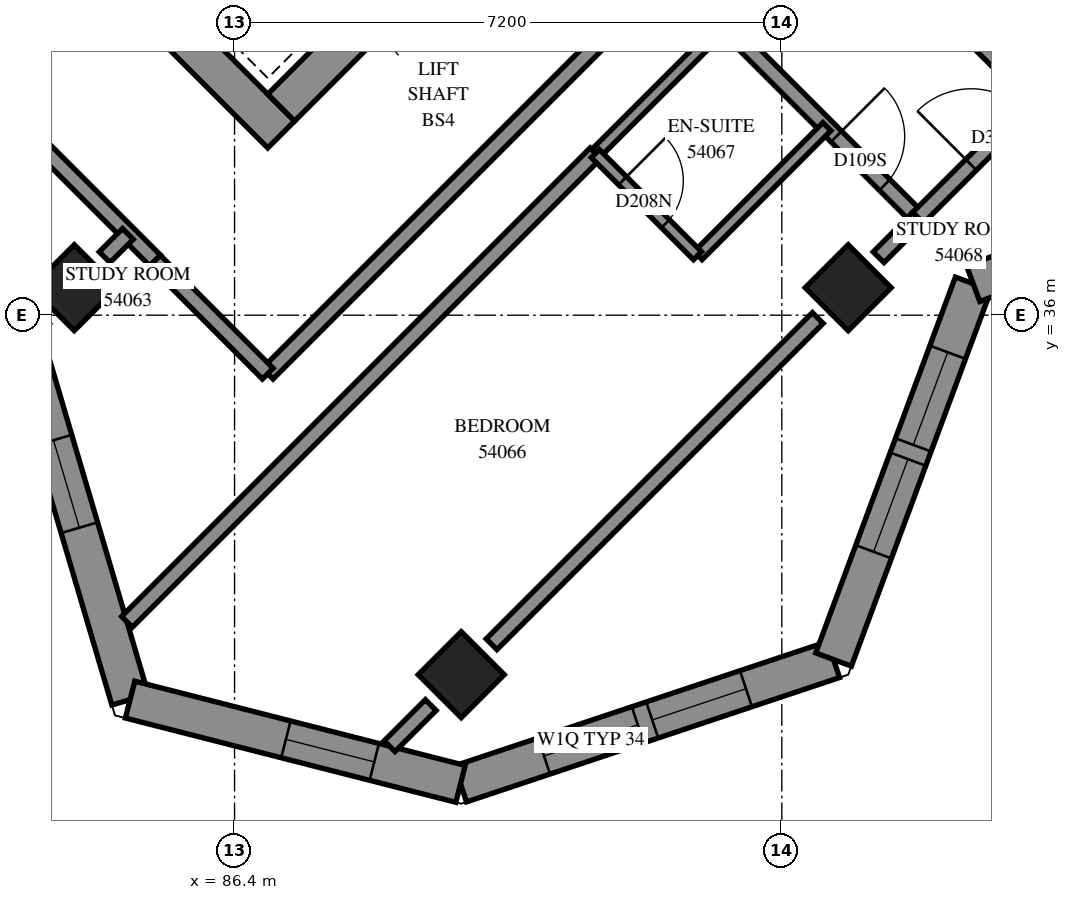
"""IFC4 building model, lengths in metres.
Left out: names, types, materials, properties, quantities, classifications, styles, units other than length and angle.
Written with IfcOpenShell. Run it as: python <this file> out.ifc"""

import sys

from ifc_helpers import new_model, si_unit, direction, frame, frame_2d, origin, origin_2d, place, context, subcontext, project, spatial, polyline, rectangle, outline, extrude, element, fill, save


model = new_model("IFC4")
c1 = context("Model", 3, precision=1e-05, world=origin(), true_north=direction((0.0, 1.0)))
c2 = subcontext(c1, "Body", "Model", "MODEL_VIEW")
j1 = project(units=[si_unit("LENGTHUNIT", "METRE"), si_unit("PLANEANGLEUNIT", "RADIAN")], contexts=[c1])
p1 = place(None, origin())
s1 = spatial("IfcSite", under=j1, at=p1, CompositionType="ELEMENT")
p2 = place(p1, origin())
s2 = spatial("IfcBuilding", under=s1, at=p2, CompositionType="ELEMENT")
p3 = place(p2, frame((0.0, 0.0, 199.8)))
s3 = spatial("IfcBuildingStorey", under=s2, at=p3, CompositionType="ELEMENT", Elevation=199.8)
for number, where, z_axis, x_axis in (
    (1, (84.291, 36.362, 0.0), (0.0, 0.0, 1.0), (0.707, -0.707, 0.0)),
    (2, (94.474, 36.362, 0.0), (0.0, 0.0, 1.0), (0.707, -0.707, 0.0)),
    (3, (89.382, 31.271, 0.0), (0.0, 0.0, 1.0), (0.707, -0.707, 0.0)),
):
    element("IfcColumn", number, at=place(p3, frame(where, z_axis=z_axis, x_axis=x_axis)), inside=s3, PredefinedType="COLUMN", context=c2, shape_type="SweptSolid", body=[
        extrude(rectangle(XDim=0.8, YDim=0.8, at=origin_2d()), origin(), (0.0, 0.0, 1.0), 3.1),
    ])
p4 = place(p3, frame((76.124, 49.267, -0.3), z_axis=(0.0, 0.0, 1.0), x_axis=(0.7071067812, -0.7071067812, 0.0)))
e4 = element("IfcWall", 4, at=p4, inside=s3, PredefinedType="SHEAR", context=c2, shape_type="SweptSolid", body=[
    extrude(rectangle(XDim=15.4, YDim=0.5, at=frame_2d((7.7, 0.0))), origin(), (0.0, 0.0, 1.0), 2.7),
])
p5 = place(p3, frame((87.013, 38.731, -0.3), z_axis=(0.0, 0.0, 1.0), x_axis=(0.7071067812, 0.7071067812, 0.0)))
e5 = element("IfcWall", 5, at=p5, inside=s3, PredefinedType="SHEAR", context=c2, shape_type="SweptSolid", body=[
    extrude(rectangle(XDim=14.4, YDim=0.5, at=frame_2d((7.2, 0.0))), origin(), (0.0, 0.0, 1.0), 2.7),
])
p6 = place(p5, frame((4.55, 0.0, 0.3)))
e6 = element("IfcOpeningElement", 6, at=p6, cuts=e5, PredefinedType="OPENING", context=c2, shape_type="SweptSolid", body=[
    extrude(rectangle(XDim=1.1, YDim=2.1, at=frame_2d((0.55, 1.05))), frame((0.0, 0.26, 0.0), z_axis=(0.0, -1.0, 0.0), x_axis=(1.0, 0.0, 0.0)), (0.0, 0.0, 1.0), 0.52),
])
p7 = place(p5, frame((11.35, 0.0, 0.3)))
e7 = element("IfcOpeningElement", 7, at=p7, cuts=e5, PredefinedType="OPENING", context=c2, shape_type="SweptSolid", body=[
    extrude(rectangle(XDim=1.1, YDim=2.1, at=frame_2d((0.55, 1.05))), frame((0.0, 0.26, 0.0), z_axis=(0.0, -1.0, 0.0), x_axis=(1.0, 0.0, 0.0)), (0.0, 0.0, 1.0), 0.52),
])
p8 = place(p3, frame((89.373, 29.834, 0.0), z_axis=(0.0, 0.0, 1.0), x_axis=(0.9486871639, 0.3162161681, 0.0)))
e8 = element("IfcWall", 8, at=p8, inside=s3, PredefinedType="SOLIDWALL", context=c2, shape_type="SweptSolid", body=[
    extrude(outline(polyline([(-0.073, -0.25), (5.293, -0.25), (5.054, 0.25), (0.073, 0.25), (-0.073, -0.25)])), origin(), (0.0, 0.0, 1.0), 3.1),
])
p9 = place(p8, frame((1.158, 0.0, 0.45)))
e9 = element("IfcOpeningElement", 9, at=p9, cuts=e8, PredefinedType="OPENING", context=c2, shape_type="SweptSolid", body=[
    extrude(rectangle(XDim=1.3, YDim=2.5, at=frame_2d((0.65, 1.25))), frame((0.0, 0.26, 0.0), z_axis=(0.0, -1.0, 0.0), x_axis=(1.0, 0.0, 0.0)), (0.0, 0.0, 1.0), 0.52),
])
p10 = place(p8, frame((2.658, 0.0, 0.45)))
e10 = element("IfcOpeningElement", 10, at=p10, cuts=e8, PredefinedType="OPENING", context=c2, shape_type="SweptSolid", body=[
    extrude(rectangle(XDim=1.3, YDim=2.5, at=frame_2d((0.65, 1.25))), frame((0.0, 0.26, 0.0), z_axis=(0.0, -1.0, 0.0), x_axis=(1.0, 0.0, 0.0)), (0.0, 0.0, 1.0), 0.52),
])
p11 = place(p3, frame((94.281, 31.47, 0.0), z_axis=(0.0, 0.0, 1.0), x_axis=(0.3481903374, 0.9374238577, 0.0)))
e11 = element("IfcWall", 11, at=p11, inside=s3, PredefinedType="SOLIDWALL", context=c2, shape_type="SweptSolid", body=[
    extrude(outline(polyline([(-0.12, -0.25), (5.16, -0.25), (5.39, 0.25), (0.12, 0.25), (-0.12, -0.25)])), origin(), (0.0, 0.0, 1.0), 3.1),
])
p12 = place(p11, frame((1.512, 0.0, 0.45)))
e12 = element("IfcOpeningElement", 12, at=p12, cuts=e11, PredefinedType="OPENING", context=c2, shape_type="SweptSolid", body=[
    extrude(rectangle(XDim=1.3, YDim=2.5, at=frame_2d((0.65, 1.25))), frame((0.0, 0.26, 0.0), z_axis=(0.0, -1.0, 0.0), x_axis=(1.0, 0.0, 0.0)), (0.0, 0.0, 1.0), 0.52),
])
p13 = place(p11, frame((3.012, 0.0, 0.45)))
e13 = element("IfcOpeningElement", 13, at=p13, cuts=e11, PredefinedType="OPENING", context=c2, shape_type="SweptSolid", body=[
    extrude(rectangle(XDim=1.3, YDim=2.5, at=frame_2d((0.65, 1.25))), frame((0.0, 0.26, 0.0), z_axis=(0.0, -1.0, 0.0), x_axis=(1.0, 0.0, 0.0)), (0.0, 0.0, 1.0), 0.52),
])
p14 = place(p3, frame((96.118, 36.415, 0.0), z_axis=(0.0, 0.0, 1.0), x_axis=(0.9374238577, 0.3481903374, 0.0)))
e14 = element("IfcWall", 14, at=p14, inside=s3, PredefinedType="SOLIDWALL", context=c2, shape_type="SweptSolid", body=[
    extrude(outline(polyline([(0.115, -0.25), (5.395, -0.25), (5.155, 0.25), (-0.115, 0.25), (0.115, -0.25)])), origin(), (0.0, 0.0, 1.0), 3.1),
])
p15 = place(p14, frame((1.655, 0.0, 0.45)))
e15 = element("IfcOpeningElement", 15, at=p15, cuts=e14, PredefinedType="OPENING", context=c2, shape_type="SweptSolid", body=[
    extrude(rectangle(XDim=1.3, YDim=2.5, at=frame_2d((0.65, 1.25))), frame((0.0, 0.26, 0.0), z_axis=(0.0, -1.0, 0.0), x_axis=(1.0, 0.0, 0.0)), (0.0, 0.0, 1.0), 0.52),
])
p16 = place(p14, frame((3.155, 0.0, 0.45)))
e16 = element("IfcOpeningElement", 16, at=p16, cuts=e14, PredefinedType="OPENING", context=c2, shape_type="SweptSolid", body=[
    extrude(rectangle(XDim=1.3, YDim=2.5, at=frame_2d((0.65, 1.25))), frame((0.0, 0.26, 0.0), z_axis=(0.0, -1.0, 0.0), x_axis=(1.0, 0.0, 0.0)), (0.0, 0.0, 1.0), 0.52),
])
p17 = place(p3, frame((83.724, 35.351, 0.0), z_axis=(0.0, 0.0, 1.0), x_axis=(0.2831378676, -0.9590792188, 0.0)))
e17 = element("IfcWall", 17, at=p17, inside=s3, PredefinedType="SOLIDWALL", context=c2, shape_type="SweptSolid", body=[
    extrude(outline(polyline([(0.136, -0.25), (4.739, -0.25), (4.455, 0.25), (-0.136, 0.25), (0.136, -0.25)])), origin(), (0.0, 0.0, 1.0), 3.1),
])
p18 = place(p17, frame((1.038, 0.0, 0.45)))
e18 = element("IfcOpeningElement", 18, at=p18, cuts=e17, PredefinedType="OPENING", context=c2, shape_type="SweptSolid", body=[
    extrude(rectangle(XDim=1.2, YDim=2.5, at=frame_2d((0.6, 1.25))), frame((0.0, 0.26, 0.0), z_axis=(0.0, -1.0, 0.0), x_axis=(1.0, 0.0, 0.0)), (0.0, 0.0, 1.0), 0.52),
])
p19 = place(p3, frame((85.026, 30.942, 0.0), z_axis=(0.0, 0.0, 1.0), x_axis=(0.9689909926, -0.2470960468, 0.0)))
e19 = element("IfcWall", 19, at=p19, inside=s3, PredefinedType="SOLIDWALL", context=c2, shape_type="SweptSolid", body=[
    extrude(outline(polyline([(-0.142, -0.25), (4.56, -0.25), (4.413, 0.25), (0.142, 0.25), (-0.142, -0.25)])), origin(), (0.0, 0.0, 1.0), 3.1),
])
p20 = place(p19, frame((2.115, 0.0, 0.45)))
e20 = element("IfcOpeningElement", 20, at=p20, cuts=e19, PredefinedType="OPENING", context=c2, shape_type="SweptSolid", body=[
    extrude(rectangle(XDim=1.2, YDim=2.5, at=frame_2d((0.6, 1.25))), frame((0.0, 0.26, 0.0), z_axis=(0.0, -1.0, 0.0), x_axis=(1.0, 0.0, 0.0)), (0.0, 0.0, 1.0), 0.52),
])
p21 = place(p3, frame((84.984, 31.966, 0.0), z_axis=(0.0, 0.0, 1.0), x_axis=(0.7071067812, 0.7071067812, 0.0)))
e21 = element("IfcWall", 21, at=p21, inside=s3, PredefinedType="PARTITIONING", context=c2, shape_type="SweptSolid", body=[
    extrude(rectangle(XDim=8.719, YDim=0.2, at=frame_2d((4.359, 0.0))), origin(), (0.0, 0.0, 1.0), 3.1),
])
p22 = place(p3, frame((86.835, 35.231, 0.0), z_axis=(0.0, 0.0, 1.0), x_axis=(0.7071067812, 0.7071067812, 0.0)))
e22 = element("IfcWall", 22, at=p22, inside=s3, PredefinedType="PARTITIONING", context=c2, shape_type="SweptSolid", body=[
    extrude(rectangle(XDim=7.501, YDim=0.2, at=frame_2d((3.751, 0.0))), origin(), (0.0, 0.0, 1.0), 3.1),
])
p23 = place(p22, frame((6.243, 0.0, 0.0)))
e23 = element("IfcOpeningElement", 23, at=p23, cuts=e22, PredefinedType="OPENING", context=c2, shape_type="SweptSolid", body=[
    extrude(rectangle(XDim=1.0, YDim=2.1, at=frame_2d((0.5, 1.05))), frame((0.0, 0.11, 0.0), z_axis=(0.0, -1.0, 0.0), x_axis=(1.0, 0.0, 0.0)), (0.0, 0.0, 1.0), 0.22),
])
p24 = place(p3, frame((80.522, 41.553, 0.0), z_axis=(0.0, 0.0, 1.0), x_axis=(0.7071067812, -0.7071067812, 0.0)))
e24 = element("IfcWall", 24, at=p24, inside=s3, PredefinedType="PARTITIONING", context=c2, shape_type="SweptSolid", body=[
    extrude(rectangle(XDim=6.836, YDim=0.2, at=frame_2d((3.418, 0.0))), origin(), (0.0, 0.0, 1.0), 3.1),
])
p25 = place(p3, frame((89.781, 31.671, 0.0), z_axis=(0.0, 0.0, 1.0), x_axis=(0.7071067812, 0.7071067812, 0.0)))
e25 = element("IfcWall", 25, at=p25, inside=s3, PredefinedType="PARTITIONING", context=c2, shape_type="SweptSolid", body=[
    extrude(rectangle(XDim=6.07, YDim=0.2, at=frame_2d((3.035, 0.0))), origin(), (0.0, 0.0, 1.0), 2.6),
])
p26 = place(p3, frame((93.693, 42.085, 0.0), z_axis=(0.0, 0.0, 1.0), x_axis=(0.7071067812, -0.7071067812, 0.0)))
e26 = element("IfcWall", 26, at=p26, inside=s3, PredefinedType="PARTITIONING", context=c2, shape_type="SweptSolid", body=[
    extrude(rectangle(XDim=4.599, YDim=0.2, at=frame_2d((2.3, 0.0))), origin(), (0.0, 0.0, 1.0), 3.1),
])
p27 = place(p26, frame((1.349, 0.0, 0.0)))
e27 = element("IfcOpeningElement", 27, at=p27, cuts=e26, PredefinedType="OPENING", context=c2, shape_type="SweptSolid", body=[
    extrude(rectangle(XDim=0.9, YDim=2.1, at=frame_2d((0.45, 1.05))), frame((0.0, 0.11, 0.0), z_axis=(0.0, -1.0, 0.0), x_axis=(1.0, 0.0, 0.0)), (0.0, 0.0, 1.0), 0.22),
])
p28 = place(p3, frame((92.137, 40.531, 0.0), z_axis=(0.0, 0.0, 1.0), x_axis=(0.7071067812, -0.7071067812, 0.0)))
e28 = element("IfcWall", 28, at=p28, inside=s3, PredefinedType="PARTITIONING", context=c2, shape_type="SweptSolid", body=[
    extrude(rectangle(XDim=4.599, YDim=0.2, at=frame_2d((2.3, 0.0))), origin(), (0.0, 0.0, 1.0), 3.1),
])
p29 = place(p28, frame((3.083, 0.0, 0.0)))
e29 = element("IfcOpeningElement", 29, at=p29, cuts=e28, PredefinedType="OPENING", context=c2, shape_type="SweptSolid", body=[
    extrude(rectangle(XDim=0.9, YDim=2.1, at=frame_2d((0.45, 1.05))), frame((0.0, 0.11, 0.0), z_axis=(0.0, -1.0, 0.0), x_axis=(1.0, 0.0, 0.0)), (0.0, 0.0, 1.0), 0.22),
])
for number, where, z_axis, x_axis in (
    (30, (91.152, 38.128, 0.0), (0.0, 0.0, 1.0), (0.708, 0.707, 0.0)),
    (31, (92.497, 36.783, 0.0), (0.0, 0.0, 1.0), (0.707, 0.708, 0.0)),
):
    element("IfcWall", number, at=place(p3, frame(where, z_axis=z_axis, x_axis=x_axis)), inside=s3, PredefinedType="PARTITIONING", context=c2, shape_type="SweptSolid", body=[
        extrude(rectangle(XDim=2.4, YDim=0.15, at=frame_2d((1.2, 0.0))), origin(), (0.0, 0.0, 1.0), 3.1),
    ])
p30 = place(p3, frame((95.392, 37.282, 0.0), z_axis=(0.0, 0.0, 1.0), x_axis=(0.7075613659, 0.706651904, 0.0)))
e32 = element("IfcWall", 32, at=p30, inside=s3, PredefinedType="PARTITIONING", context=c2, shape_type="SweptSolid", body=[
    extrude(rectangle(XDim=2.199, YDim=0.2, at=frame_2d((1.1, 0.0))), origin(), (0.0, 0.0, 1.0), 2.6),
])
p31 = place(p30, frame((0.987, 0.0, 0.0)))
e33 = element("IfcOpeningElement", 33, at=p31, cuts=e32, PredefinedType="OPENING", context=c2, shape_type="SweptSolid", body=[
    extrude(rectangle(XDim=1.0, YDim=2.1, at=frame_2d((0.5, 1.05))), frame((0.0, 0.11, 0.0), z_axis=(0.0, -1.0, 0.0), x_axis=(1.0, 0.0, 0.0)), (0.0, 0.0, 1.0), 0.22),
])
p32 = place(p3, frame((85.353, 36.717, 0.0), z_axis=(0.0, 0.0, 1.0), x_axis=(0.7066304548, -0.7075827869, 0.0)))
e34 = element("IfcWall", 34, at=p32, inside=s3, PredefinedType="PARTITIONING", context=c2, shape_type="SweptSolid", body=[
    extrude(rectangle(XDim=2.1, YDim=0.2, at=frame_2d((1.05, 0.0))), origin(), (0.0, 0.0, 1.0), 3.1),
])
p33 = place(p3, frame((91.147, 38.127, 0.0), z_axis=(0.0, 0.0, 1.0), x_axis=(0.7071067812, -0.7071067812, 0.0)))
e35 = element("IfcWall", 35, at=p33, inside=s3, PredefinedType="PARTITIONING", context=c2, shape_type="SweptSolid", body=[
    extrude(rectangle(XDim=1.901, YDim=0.15, at=frame_2d((0.95, 0.0))), origin(), (0.0, 0.0, 1.0), 3.1),
])
p34 = place(p33, frame((0.506, 0.0, 0.0)))
e36 = element("IfcOpeningElement", 36, at=p34, cuts=e35, PredefinedType="OPENING", context=c2, shape_type="SweptSolid", body=[
    extrude(rectangle(XDim=0.8, YDim=2.1, at=frame_2d((0.4, 1.05))), frame((0.0, 0.085, 0.0), z_axis=(0.0, -1.0, 0.0), x_axis=(1.0, 0.0, 0.0)), (0.0, 0.0, 1.0), 0.17),
])
p35 = place(p3, frame((94.874, 36.763, 0.0), z_axis=(0.0, 0.0, 1.0), x_axis=(0.7057430303, 0.7084679069, 0.0)))
e37 = element("IfcWall", 37, at=p35, inside=s3, PredefinedType="PARTITIONING", context=c2, shape_type="SweptSolid", body=[
    extrude(rectangle(XDim=0.734, YDim=0.2, at=frame_2d((0.367, 0.0))), origin(), (0.0, 0.0, 1.0), 2.6),
])
p36 = place(p3, frame((88.44, 30.33, 0.0), z_axis=(0.0, 0.0, 1.0), x_axis=(0.7071067812, 0.7071067812, 0.0)))
e38 = element("IfcWall", 38, at=p36, inside=s3, PredefinedType="PARTITIONING", context=c2, shape_type="SweptSolid", body=[
    extrude(rectangle(XDim=0.765, YDim=0.2, at=frame_2d((0.383, 0.0))), origin(), (0.0, 0.0, 1.0), 3.1),
])
p37 = place(p3, frame((84.691, 36.763, 0.0), z_axis=(0.0, 0.0, 1.0), x_axis=(0.7071067812, 0.7071067812, 0.0)))
e39 = element("IfcWall", 39, at=p37, inside=s3, PredefinedType="PARTITIONING", context=c2, shape_type="SweptSolid", body=[
    extrude(rectangle(XDim=0.433, YDim=0.2, at=frame_2d((0.216, 0.0))), origin(), (0.0, 0.0, 1.0), 3.1),
])
p38 = place(p9, origin())
e40 = element("IfcWindow", 40, at=p38, inside=s3, PartitioningType="SINGLE_PANEL", PredefinedType="WINDOW", context=c2, shape_type="SweptSolid", body=[
    extrude(rectangle(XDim=1.3, YDim=2.5, at=frame_2d((0.65, 1.25))), frame((0.0, 0.18, 0.0), z_axis=(0.0, -1.0, 0.0), x_axis=(1.0, 0.0, 0.0)), (0.0, 0.0, 1.0), 0.06),
])
fill(e9, e40)
p39 = place(p10, origin())
e41 = element("IfcWindow", 41, at=p39, inside=s3, PartitioningType="SINGLE_PANEL", PredefinedType="WINDOW", context=c2, shape_type="SweptSolid", body=[
    extrude(rectangle(XDim=1.3, YDim=2.5, at=frame_2d((0.65, 1.25))), frame((0.0, 0.18, 0.0), z_axis=(0.0, -1.0, 0.0), x_axis=(1.0, 0.0, 0.0)), (0.0, 0.0, 1.0), 0.06),
])
fill(e10, e41)
p40 = place(p12, origin())
e42 = element("IfcWindow", 42, at=p40, inside=s3, PartitioningType="SINGLE_PANEL", PredefinedType="WINDOW", context=c2, shape_type="SweptSolid", body=[
    extrude(rectangle(XDim=1.3, YDim=2.5, at=frame_2d((0.65, 1.25))), frame((0.0, 0.18, 0.0), z_axis=(0.0, -1.0, 0.0), x_axis=(1.0, 0.0, 0.0)), (0.0, 0.0, 1.0), 0.06),
])
fill(e12, e42)
p41 = place(p13, origin())
e43 = element("IfcWindow", 43, at=p41, inside=s3, PartitioningType="SINGLE_PANEL", PredefinedType="WINDOW", context=c2, shape_type="SweptSolid", body=[
    extrude(rectangle(XDim=1.3, YDim=2.5, at=frame_2d((0.65, 1.25))), frame((0.0, 0.18, 0.0), z_axis=(0.0, -1.0, 0.0), x_axis=(1.0, 0.0, 0.0)), (0.0, 0.0, 1.0), 0.06),
])
fill(e13, e43)
p42 = place(p18, origin())
e44 = element("IfcWindow", 44, at=p42, inside=s3, PartitioningType="SINGLE_PANEL", PredefinedType="WINDOW", context=c2, shape_type="SweptSolid", body=[
    extrude(rectangle(XDim=1.2, YDim=2.5, at=frame_2d((0.6, 1.25))), frame((0.0, 0.18, 0.0), z_axis=(0.0, -1.0, 0.0), x_axis=(1.0, 0.0, 0.0)), (0.0, 0.0, 1.0), 0.06),
])
fill(e18, e44)
p43 = place(p20, origin())
e45 = element("IfcWindow", 45, at=p43, inside=s3, PartitioningType="SINGLE_PANEL", PredefinedType="WINDOW", context=c2, shape_type="SweptSolid", body=[
    extrude(rectangle(XDim=1.2, YDim=2.5, at=frame_2d((0.6, 1.25))), frame((0.0, 0.18, 0.0), z_axis=(0.0, -1.0, 0.0), x_axis=(1.0, 0.0, 0.0)), (0.0, 0.0, 1.0), 0.06),
])
fill(e20, e45)
p44 = place(p29, origin())
e46 = element("IfcDoor", 46, at=p44, inside=s3, OperationType="SINGLE_SWING_LEFT", PredefinedType="DOOR", context=c2, shape_type="SweptSolid", body=[
    extrude(rectangle(XDim=0.9, YDim=2.1, at=frame_2d((0.45, 1.05))), frame((0.0, 0.025, 0.0), z_axis=(0.0, -1.0, 0.0), x_axis=(1.0, 0.0, 0.0)), (0.0, 0.0, 1.0), 0.05),
])
fill(e29, e46)
p45 = place(p34, origin())
e47 = element("IfcDoor", 47, at=p45, inside=s3, OperationType="SINGLE_SWING_RIGHT", PredefinedType="DOOR", context=c2, shape_type="SweptSolid", body=[
    extrude(rectangle(XDim=0.8, YDim=2.1, at=frame_2d((0.4, 1.05))), frame((0.0, 0.025, 0.0), z_axis=(0.0, -1.0, 0.0), x_axis=(1.0, 0.0, 0.0)), (0.0, 0.0, 1.0), 0.05),
])
fill(e36, e47)
p46 = place(p31, origin())
e48 = element("IfcDoor", 48, at=p46, inside=s3, OperationType="SINGLE_SWING_RIGHT", PredefinedType="DOOR", context=c2, shape_type="SweptSolid", body=[
    extrude(rectangle(XDim=1.0, YDim=2.1, at=frame_2d((0.5, 1.05))), frame((0.0, 0.025, 0.0), z_axis=(0.0, -1.0, 0.0), x_axis=(1.0, 0.0, 0.0)), (0.0, 0.0, 1.0), 0.05),
])
fill(e33, e48)
save(model, sys.argv[1])
